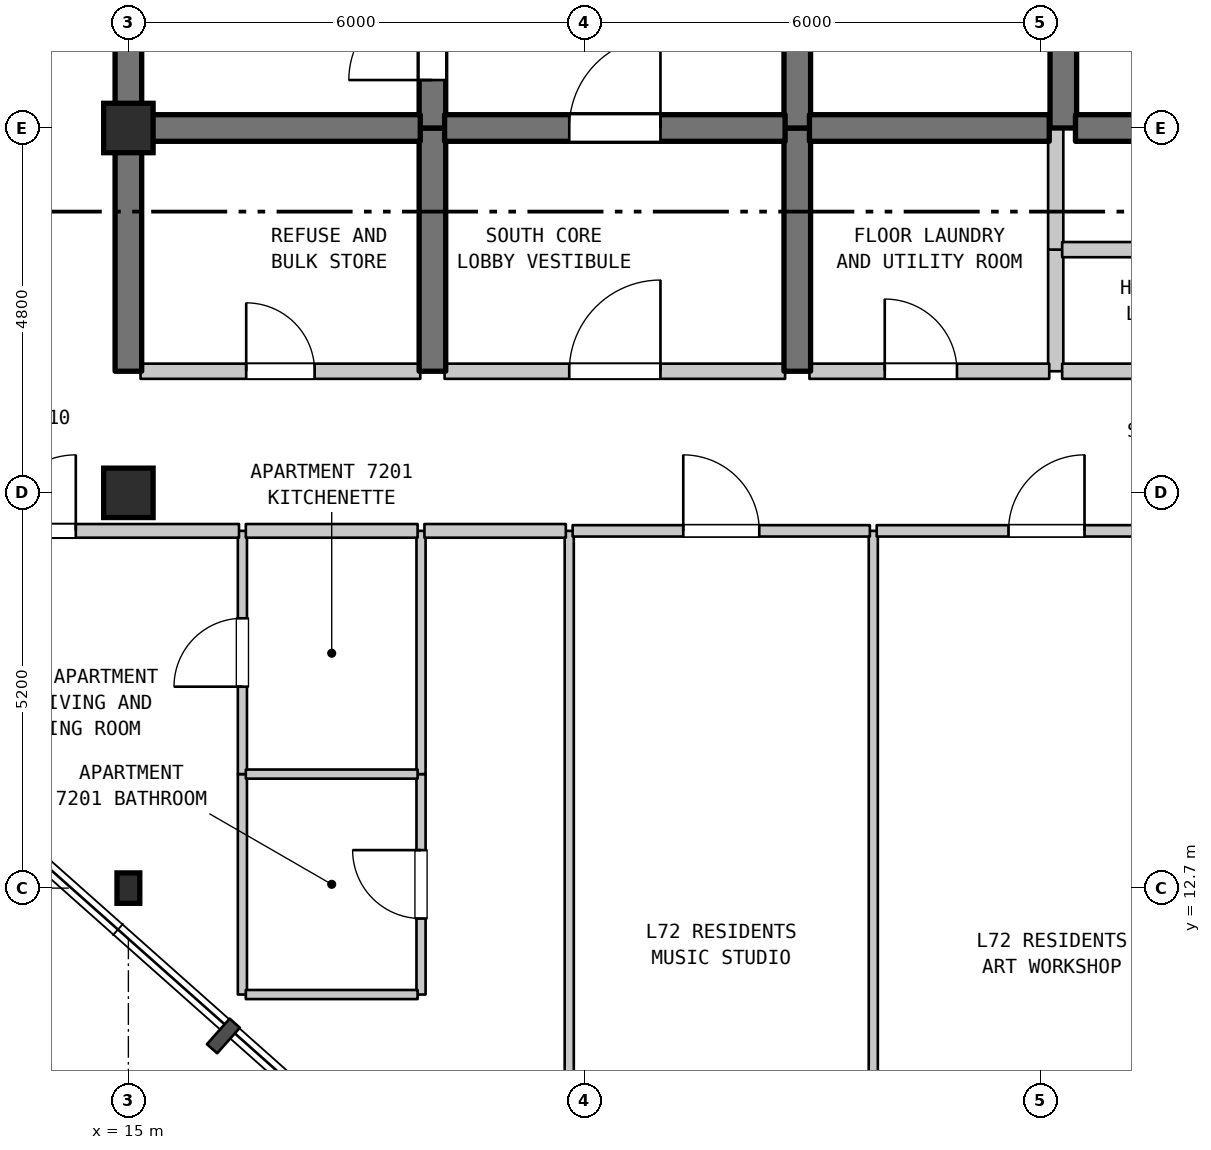
"""IFC4 building model, lengths in metres.
Left out: names, types, materials, properties, quantities, classifications, styles, units other than length and angle.
Written with IfcOpenShell. Run it as: python <this file> out.ifc"""

import sys

from ifc_helpers import new_model, si_unit, direction, frame, frame_2d, origin, origin_2d, place, context, subcontext, project, spatial, rectangle, i_section, extrude, element, fill, save


model = new_model("IFC4")
c1 = context("Model", 3, precision=1e-05, world=origin(), true_north=direction((0.0, 1.0)))
c2 = subcontext(c1, "Body", "Model", "MODEL_VIEW")
j1 = project(units=[si_unit("LENGTHUNIT", "METRE"), si_unit("PLANEANGLEUNIT", "RADIAN")], contexts=[c1])
p1 = place(None, origin())
s1 = spatial("IfcSite", under=j1, at=p1, CompositionType="ELEMENT")
p2 = place(p1, origin())
s2 = spatial("IfcBuilding", under=s1, at=p2, CompositionType="ELEMENT")
p3 = place(p2, frame((0.0, 0.0, 288.0)))
s3 = spatial("IfcBuildingStorey", under=s2, at=p3, CompositionType="ELEMENT", Elevation=288.0)
p4 = place(p3, frame((15.0, 12.7, 0.0), z_axis=(0.0, 0.0, 1.0), x_axis=(1.0, 0.0, 0.0)))
e1 = element("IfcColumn", 1, at=p4, inside=s3, PredefinedType="COLUMN", context=c2, shape_type="SweptSolid", body=[
    extrude(i_section(OverallWidth=0.3, OverallDepth=0.4, WebThickness=0.013, FlangeThickness=0.024, FilletRadius=0.027, at=origin_2d()), origin(), (0.0, 0.0, 1.0), 3.7),
])
for number, where, z_axis, x_axis in (
    (2, (15.0, 17.9, 0.0), (0.0, 0.0, 1.0), (1.0, 0.0, 0.0)),
    (3, (15.0, 22.7, 0.0), (0.0, 0.0, 1.0), (1.0, 0.0, 0.0)),
):
    element("IfcColumn", number, at=place(p3, frame(where, z_axis=z_axis, x_axis=x_axis)), inside=s3, PredefinedType="COLUMN", context=c2, shape_type="SweptSolid", body=[
        extrude(rectangle(XDim=0.65, YDim=0.65, at=origin_2d()), origin(), (0.0, 0.0, 1.0), 3.7),
    ])
p5 = place(p3, frame((15.0, 19.5, 0.0), z_axis=(0.0, 0.0, 1.0), x_axis=(0.0, 1.0, 0.0)))
e4 = element("IfcWall", 4, at=p5, inside=s3, PredefinedType="SHEAR", context=c2, shape_type="SweptSolid", body=[
    extrude(rectangle(XDim=3.2, YDim=0.35, at=frame_2d((1.6, 0.0))), origin(), (0.0, 0.0, 1.0), 3.39),
])
p6 = place(p3, frame((15.0, 22.7, 0.0), z_axis=(0.0, 0.0, 1.0), x_axis=(0.0, 1.0, 0.0)))
e5 = element("IfcWall", 5, at=p6, inside=s3, PredefinedType="SHEAR", context=c2, shape_type="SweptSolid", body=[
    extrude(rectangle(XDim=6.8, YDim=0.35, at=frame_2d((3.4, 0.0))), origin(), (0.0, 0.0, 1.0), 3.39),
])
p7 = place(p3, frame((16.5, 11.3, 0.0), z_axis=(0.0, 0.0, 1.0), x_axis=(0.0, 1.0, 0.0)))
e6 = element("IfcWall", 6, at=p7, inside=s3, PredefinedType="PARTITIONING", context=c2, shape_type="SweptSolid", body=[
    extrude(rectangle(XDim=2.9, YDim=0.12, at=frame_2d((1.45, 0.0))), origin(), (0.0, 0.0, 1.0), 3.39),
])
p8 = place(p3, frame((16.5, 14.2, 0.0), z_axis=(0.0, 0.0, 1.0), x_axis=(0.0, 1.0, 0.0)))
e7 = element("IfcWall", 7, at=p8, inside=s3, PredefinedType="PARTITIONING", context=c2, shape_type="SweptSolid", body=[
    extrude(rectangle(XDim=3.2, YDim=0.12, at=frame_2d((1.6, 0.0))), origin(), (0.0, 0.0, 1.0), 3.39),
])
p9 = place(p8, frame((1.15, 0.0, 0.0)))
e8 = element("IfcOpeningElement", 8, at=p9, cuts=e7, PredefinedType="OPENING", context=c2, shape_type="SweptSolid", body=[
    extrude(rectangle(XDim=0.9, YDim=2.15, at=frame_2d((0.45, 1.075))), frame((0.0, 0.07, 0.0), z_axis=(0.0, -1.0, 0.0), x_axis=(1.0, 0.0, 0.0)), (0.0, 0.0, 1.0), 0.14),
])
p10 = place(p3, frame((18.85, 11.3, 0.0), z_axis=(0.0, 0.0, 1.0), x_axis=(0.0, 1.0, 0.0)))
e9 = element("IfcWall", 9, at=p10, inside=s3, PredefinedType="PARTITIONING", context=c2, shape_type="SweptSolid", body=[
    extrude(rectangle(XDim=2.9, YDim=0.12, at=frame_2d((1.45, 0.0))), origin(), (0.0, 0.0, 1.0), 3.39),
])
p11 = place(p10, frame((1.0, 0.0, 0.0)))
e10 = element("IfcOpeningElement", 10, at=p11, cuts=e9, PredefinedType="OPENING", context=c2, shape_type="SweptSolid", body=[
    extrude(rectangle(XDim=0.9, YDim=2.1, at=frame_2d((0.45, 1.05))), frame((0.0, 0.07, 0.0), z_axis=(0.0, -1.0, 0.0), x_axis=(1.0, 0.0, 0.0)), (0.0, 0.0, 1.0), 0.14),
])
p12 = place(p3, frame((18.85, 14.2, 0.0), z_axis=(0.0, 0.0, 1.0), x_axis=(0.0, 1.0, 0.0)))
e11 = element("IfcWall", 11, at=p12, inside=s3, PredefinedType="PARTITIONING", context=c2, shape_type="SweptSolid", body=[
    extrude(rectangle(XDim=3.2, YDim=0.12, at=frame_2d((1.6, 0.0))), origin(), (0.0, 0.0, 1.0), 3.39),
])
p13 = place(p3, frame((19.0, 19.5, 0.0), z_axis=(0.0, 0.0, 1.0), x_axis=(0.0, 1.0, 0.0)))
e12 = element("IfcWall", 12, at=p13, inside=s3, PredefinedType="SHEAR", context=c2, shape_type="SweptSolid", body=[
    extrude(rectangle(XDim=3.2, YDim=0.35, at=frame_2d((1.6, 0.0))), origin(), (0.0, 0.0, 1.0), 3.39),
])
p14 = place(p3, frame((19.0, 22.7, 0.0), z_axis=(0.0, 0.0, 1.0), x_axis=(0.0, 1.0, 0.0)))
e13 = element("IfcWall", 13, at=p14, inside=s3, PredefinedType="SHEAR", context=c2, shape_type="SweptSolid", body=[
    extrude(rectangle(XDim=5.5, YDim=0.35, at=frame_2d((2.75, 0.0))), origin(), (0.0, 0.0, 1.0), 3.39),
])
p15 = place(p14, frame((0.631, 0.0, 0.0)))
e14 = element("IfcOpeningElement", 14, at=p15, cuts=e13, PredefinedType="OPENING", context=c2, shape_type="SweptSolid", body=[
    extrude(rectangle(XDim=1.1, YDim=2.15, at=frame_2d((0.55, 1.075))), frame((0.0, 0.185, 0.0), z_axis=(0.0, -1.0, 0.0), x_axis=(1.0, 0.0, 0.0)), (0.0, 0.0, 1.0), 0.37),
])
p16 = place(p3, frame((20.8, 7.075, 0.0), z_axis=(0.0, 0.0, 1.0), x_axis=(0.0, 1.0, 0.0)))
e15 = element("IfcWall", 15, at=p16, inside=s3, PredefinedType="PARTITIONING", context=c2, shape_type="SweptSolid", body=[
    extrude(rectangle(XDim=10.325, YDim=0.12, at=frame_2d((5.163, 0.0))), origin(), (0.0, 0.0, 1.0), 3.39),
])
p17 = place(p3, frame((23.8, 19.5, 0.0), z_axis=(0.0, 0.0, 1.0), x_axis=(0.0, 1.0, 0.0)))
e16 = element("IfcWall", 16, at=p17, inside=s3, PredefinedType="SHEAR", context=c2, shape_type="SweptSolid", body=[
    extrude(rectangle(XDim=3.2, YDim=0.35, at=frame_2d((1.6, 0.0))), origin(), (0.0, 0.0, 1.0), 3.39),
])
p18 = place(p3, frame((23.8, 22.7, 0.0), z_axis=(0.0, 0.0, 1.0), x_axis=(0.0, 1.0, 0.0)))
e17 = element("IfcWall", 17, at=p18, inside=s3, PredefinedType="SHEAR", context=c2, shape_type="SweptSolid", body=[
    extrude(rectangle(XDim=3.4, YDim=0.35, at=frame_2d((1.7, 0.0))), origin(), (0.0, 0.0, 1.0), 3.39),
])
p19 = place(p18, frame((1.25, 0.0, 0.0)))
e18 = element("IfcOpeningElement", 18, at=p19, cuts=e17, PredefinedType="OPENING", context=c2, shape_type="SweptSolid", body=[
    extrude(rectangle(XDim=0.9, YDim=2.15, at=frame_2d((0.45, 1.075))), frame((0.0, 0.185, 0.0), z_axis=(0.0, -1.0, 0.0), x_axis=(1.0, 0.0, 0.0)), (0.0, 0.0, 1.0), 0.37),
])
p20 = place(p3, frame((24.8, 6.71, 0.0), z_axis=(0.0, 0.0, 1.0), x_axis=(0.0, 1.0, 0.0)))
e19 = element("IfcWall", 19, at=p20, inside=s3, PredefinedType="PARTITIONING", context=c2, shape_type="SweptSolid", body=[
    extrude(rectangle(XDim=10.69, YDim=0.12, at=frame_2d((5.345, 0.0))), origin(), (0.0, 0.0, 1.0), 3.39),
])
p21 = place(p3, frame((27.2, 19.5, 0.0), z_axis=(0.0, 0.0, 1.0), x_axis=(0.0, 1.0, 0.0)))
e20 = element("IfcWall", 20, at=p21, inside=s3, PredefinedType="STANDARD", context=c2, shape_type="SweptSolid", body=[
    extrude(rectangle(XDim=1.6, YDim=0.2, at=frame_2d((0.8, 0.0))), origin(), (0.0, 0.0, 1.0), 3.39),
])
p22 = place(p3, frame((27.2, 21.1, 0.0), z_axis=(0.0, 0.0, 1.0), x_axis=(0.0, 1.0, 0.0)))
e21 = element("IfcWall", 21, at=p22, inside=s3, PredefinedType="STANDARD", context=c2, shape_type="SweptSolid", body=[
    extrude(rectangle(XDim=1.6, YDim=0.2, at=frame_2d((0.8, 0.0))), origin(), (0.0, 0.0, 1.0), 3.39),
])
p23 = place(p3, frame((27.3, 22.7, 0.0), z_axis=(0.0, 0.0, 1.0), x_axis=(0.0, 1.0, 0.0)))
e22 = element("IfcWall", 22, at=p23, inside=s3, PredefinedType="SHEAR", context=c2, shape_type="SweptSolid", body=[
    extrude(rectangle(XDim=2.9, YDim=0.35, at=frame_2d((1.45, 0.0))), origin(), (0.0, 0.0, 1.0), 3.39),
])
for number, where, z_axis, x_axis in (
    (23, (16.545, 11.3, 0.0), (0.0, 0.0, 1.0), (1.0, 0.0, 0.0)),
    (24, (16.545, 14.2, 0.0), (0.0, 0.0, 1.0), (1.0, 0.0, 0.0)),
):
    element("IfcWall", number, at=place(p3, frame(where, z_axis=z_axis, x_axis=x_axis)), inside=s3, PredefinedType="PARTITIONING", context=c2, shape_type="SweptSolid", body=[
        extrude(rectangle(XDim=2.26, YDim=0.12, at=frame_2d((1.13, 0.0))), origin(), (0.0, 0.0, 1.0), 3.39),
    ])
p24 = place(p3, frame((12.975, 17.4, 0.0), z_axis=(0.0, 0.0, 1.0), x_axis=(1.0, 0.0, 0.0)))
e25 = element("IfcWall", 25, at=p24, inside=s3, PredefinedType="STANDARD", context=c2, shape_type="SweptSolid", body=[
    extrude(rectangle(XDim=3.48, YDim=0.18, at=frame_2d((1.74, 0.0))), origin(), (0.0, 0.0, 1.0), 3.39),
])
p25 = place(p24, frame((0.333, 0.0, 0.0)))
e26 = element("IfcOpeningElement", 26, at=p25, cuts=e25, PredefinedType="OPENING", context=c2, shape_type="SweptSolid", body=[
    extrude(rectangle(XDim=1.0, YDim=2.15, at=frame_2d((0.5, 1.075))), frame((0.0, 0.1, 0.0), z_axis=(0.0, -1.0, 0.0), x_axis=(1.0, 0.0, 0.0)), (0.0, 0.0, 1.0), 0.2),
])
p26 = place(p3, frame((16.545, 17.4, 0.0), z_axis=(0.0, 0.0, 1.0), x_axis=(1.0, 0.0, 0.0)))
e27 = element("IfcWall", 27, at=p26, inside=s3, PredefinedType="STANDARD", context=c2, shape_type="SweptSolid", body=[
    extrude(rectangle(XDim=2.26, YDim=0.18, at=frame_2d((1.13, 0.0))), origin(), (0.0, 0.0, 1.0), 3.39),
])
p27 = place(p3, frame((18.895, 17.4, 0.0), z_axis=(0.0, 0.0, 1.0), x_axis=(1.0, 0.0, 0.0)))
e28 = element("IfcWall", 28, at=p27, inside=s3, PredefinedType="STANDARD", context=c2, shape_type="SweptSolid", body=[
    extrude(rectangle(XDim=1.86, YDim=0.18, at=frame_2d((0.93, 0.0))), origin(), (0.0, 0.0, 1.0), 3.39),
])
p28 = place(p3, frame((20.845, 17.4, 0.0), z_axis=(0.0, 0.0, 1.0), x_axis=(1.0, 0.0, 0.0)))
e29 = element("IfcWall", 29, at=p28, inside=s3, PredefinedType="STANDARD", context=c2, shape_type="SweptSolid", body=[
    extrude(rectangle(XDim=3.91, YDim=0.15, at=frame_2d((1.955, 0.0))), origin(), (0.0, 0.0, 1.0), 3.39),
])
p29 = place(p28, frame((1.455, 0.0, 0.0)))
e30 = element("IfcOpeningElement", 30, at=p29, cuts=e29, PredefinedType="OPENING", context=c2, shape_type="SweptSolid", body=[
    extrude(rectangle(XDim=1.0, YDim=2.15, at=frame_2d((0.5, 1.075))), frame((0.0, 0.085, 0.0), z_axis=(0.0, -1.0, 0.0), x_axis=(1.0, 0.0, 0.0)), (0.0, 0.0, 1.0), 0.17),
])
p30 = place(p3, frame((24.845, 17.4, 0.0), z_axis=(0.0, 0.0, 1.0), x_axis=(1.0, 0.0, 0.0)))
e31 = element("IfcWall", 31, at=p30, inside=s3, PredefinedType="STANDARD", context=c2, shape_type="SweptSolid", body=[
    extrude(rectangle(XDim=4.61, YDim=0.15, at=frame_2d((2.305, 0.0))), origin(), (0.0, 0.0, 1.0), 3.39),
])
p31 = place(p30, frame((1.734, 0.0, 0.0)))
e32 = element("IfcOpeningElement", 32, at=p31, cuts=e31, PredefinedType="OPENING", context=c2, shape_type="SweptSolid", body=[
    extrude(rectangle(XDim=1.0, YDim=2.15, at=frame_2d((0.5, 1.075))), frame((0.0, 0.085, 0.0), z_axis=(0.0, -1.0, 0.0), x_axis=(1.0, 0.0, 0.0)), (0.0, 0.0, 1.0), 0.17),
])
p32 = place(p3, frame((15.16, 19.5, 0.0), z_axis=(0.0, 0.0, 1.0), x_axis=(1.0, 0.0, 0.0)))
e33 = element("IfcWall", 33, at=p32, inside=s3, PredefinedType="STANDARD", context=c2, shape_type="SweptSolid", body=[
    extrude(rectangle(XDim=3.68, YDim=0.2, at=frame_2d((1.84, 0.0))), origin(), (0.0, 0.0, 1.0), 3.39),
])
p33 = place(p32, frame((1.39, 0.0, 0.0)))
e34 = element("IfcOpeningElement", 34, at=p33, cuts=e33, PredefinedType="OPENING", context=c2, shape_type="SweptSolid", body=[
    extrude(rectangle(XDim=0.9, YDim=2.15, at=frame_2d((0.45, 1.075))), frame((0.0, 0.11, 0.0), z_axis=(0.0, -1.0, 0.0), x_axis=(1.0, 0.0, 0.0)), (0.0, 0.0, 1.0), 0.22),
])
p34 = place(p3, frame((19.16, 19.5, 0.0), z_axis=(0.0, 0.0, 1.0), x_axis=(1.0, 0.0, 0.0)))
e35 = element("IfcWall", 35, at=p34, inside=s3, PredefinedType="STANDARD", context=c2, shape_type="SweptSolid", body=[
    extrude(rectangle(XDim=4.48, YDim=0.2, at=frame_2d((2.24, 0.0))), origin(), (0.0, 0.0, 1.0), 3.39),
])
p35 = place(p34, frame((1.64, 0.0, 0.0)))
e36 = element("IfcOpeningElement", 36, at=p35, cuts=e35, PredefinedType="OPENING", context=c2, shape_type="SweptSolid", body=[
    extrude(rectangle(XDim=1.2, YDim=2.2, at=frame_2d((0.6, 1.1))), frame((0.0, 0.11, 0.0), z_axis=(0.0, -1.0, 0.0), x_axis=(1.0, 0.0, 0.0)), (0.0, 0.0, 1.0), 0.22),
])
p36 = place(p3, frame((23.96, 19.5, 0.0), z_axis=(0.0, 0.0, 1.0), x_axis=(1.0, 0.0, 0.0)))
e37 = element("IfcWall", 37, at=p36, inside=s3, PredefinedType="STANDARD", context=c2, shape_type="SweptSolid", body=[
    extrude(rectangle(XDim=3.155, YDim=0.2, at=frame_2d((1.578, 0.0))), origin(), (0.0, 0.0, 1.0), 3.39),
])
p37 = place(p36, frame((0.991, 0.0, 0.0)))
e38 = element("IfcOpeningElement", 38, at=p37, cuts=e37, PredefinedType="OPENING", context=c2, shape_type="SweptSolid", body=[
    extrude(rectangle(XDim=0.95, YDim=2.15, at=frame_2d((0.475, 1.075))), frame((0.0, 0.11, 0.0), z_axis=(0.0, -1.0, 0.0), x_axis=(1.0, 0.0, 0.0)), (0.0, 0.0, 1.0), 0.22),
])
p38 = place(p3, frame((27.285, 19.5, 0.0), z_axis=(0.0, 0.0, 1.0), x_axis=(1.0, 0.0, 0.0)))
e39 = element("IfcWall", 39, at=p38, inside=s3, PredefinedType="STANDARD", context=c2, shape_type="SweptSolid", body=[
    extrude(rectangle(XDim=3.43, YDim=0.2, at=frame_2d((1.715, 0.0))), origin(), (0.0, 0.0, 1.0), 3.39),
])
p39 = place(p38, frame((1.192, 0.0, 0.0)))
e40 = element("IfcOpeningElement", 40, at=p39, cuts=e39, PredefinedType="OPENING", context=c2, shape_type="SweptSolid", body=[
    extrude(rectangle(XDim=0.9, YDim=2.15, at=frame_2d((0.45, 1.075))), frame((0.0, 0.11, 0.0), z_axis=(0.0, -1.0, 0.0), x_axis=(1.0, 0.0, 0.0)), (0.0, 0.0, 1.0), 0.22),
])
p40 = place(p3, frame((27.285, 21.1, 0.0), z_axis=(0.0, 0.0, 1.0), x_axis=(1.0, 0.0, 0.0)))
e41 = element("IfcWall", 41, at=p40, inside=s3, PredefinedType="STANDARD", context=c2, shape_type="SweptSolid", body=[
    extrude(rectangle(XDim=3.355, YDim=0.2, at=frame_2d((1.677, 0.0))), origin(), (0.0, 0.0, 1.0), 3.39),
])
p41 = place(p3, frame((15.16, 22.7, 0.0), z_axis=(0.0, 0.0, 1.0), x_axis=(1.0, 0.0, 0.0)))
e42 = element("IfcWall", 42, at=p41, inside=s3, PredefinedType="SHEAR", context=c2, shape_type="SweptSolid", body=[
    extrude(rectangle(XDim=3.68, YDim=0.35, at=frame_2d((1.84, 0.0))), origin(), (0.0, 0.0, 1.0), 3.39),
])
p42 = place(p3, frame((19.16, 22.7, 0.0), z_axis=(0.0, 0.0, 1.0), x_axis=(1.0, 0.0, 0.0)))
e43 = element("IfcWall", 43, at=p42, inside=s3, PredefinedType="SHEAR", context=c2, shape_type="SweptSolid", body=[
    extrude(rectangle(XDim=4.48, YDim=0.35, at=frame_2d((2.24, 0.0))), origin(), (0.0, 0.0, 1.0), 3.39),
])
p43 = place(p42, frame((1.64, 0.0, 0.0)))
e44 = element("IfcOpeningElement", 44, at=p43, cuts=e43, PredefinedType="OPENING", context=c2, shape_type="SweptSolid", body=[
    extrude(rectangle(XDim=1.2, YDim=2.2, at=frame_2d((0.6, 1.1))), frame((0.0, 0.185, 0.0), z_axis=(0.0, -1.0, 0.0), x_axis=(1.0, 0.0, 0.0)), (0.0, 0.0, 1.0), 0.37),
])
p44 = place(p3, frame((23.96, 22.7, 0.0), z_axis=(0.0, 0.0, 1.0), x_axis=(1.0, 0.0, 0.0)))
e45 = element("IfcWall", 45, at=p44, inside=s3, PredefinedType="SHEAR", context=c2, shape_type="SweptSolid", body=[
    extrude(rectangle(XDim=3.155, YDim=0.35, at=frame_2d((1.578, 0.0))), origin(), (0.0, 0.0, 1.0), 3.39),
])
p45 = place(p3, frame((27.46, 22.7, 0.0), z_axis=(0.0, 0.0, 1.0), x_axis=(1.0, 0.0, 0.0)))
e46 = element("IfcWall", 46, at=p45, inside=s3, PredefinedType="SHEAR", context=c2, shape_type="SweptSolid", body=[
    extrude(rectangle(XDim=3.18, YDim=0.35, at=frame_2d((1.59, 0.0))), origin(), (0.0, 0.0, 1.0), 3.39),
])
p46 = place(p9, origin())
e47 = element("IfcDoor", 47, at=p46, inside=s3, OperationType="SINGLE_SWING_LEFT", PredefinedType="DOOR", context=c2, shape_type="SweptSolid", body=[
    extrude(rectangle(XDim=0.9, YDim=2.15, at=frame_2d((0.45, 1.075))), frame((0.0, 0.025, 0.0), z_axis=(0.0, -1.0, 0.0), x_axis=(1.0, 0.0, 0.0)), (0.0, 0.0, 1.0), 0.05),
])
fill(e8, e47)
p47 = place(p11, origin())
e48 = element("IfcDoor", 48, at=p47, inside=s3, OperationType="SINGLE_SWING_RIGHT", PredefinedType="DOOR", context=c2, shape_type="SweptSolid", body=[
    extrude(rectangle(XDim=0.9, YDim=2.1, at=frame_2d((0.45, 1.05))), frame((0.0, 0.025, 0.0), z_axis=(0.0, -1.0, 0.0), x_axis=(1.0, 0.0, 0.0)), (0.0, 0.0, 1.0), 0.05),
])
fill(e10, e48)
p48 = place(p15, origin())
e49 = element("IfcDoor", 49, at=p48, inside=s3, OperationType="SINGLE_SWING_LEFT", PredefinedType="DOOR", context=c2, shape_type="SweptSolid", body=[
    extrude(rectangle(XDim=1.1, YDim=2.15, at=frame_2d((0.55, 1.075))), frame((0.0, 0.025, 0.0), z_axis=(0.0, -1.0, 0.0), x_axis=(1.0, 0.0, 0.0)), (0.0, 0.0, 1.0), 0.05),
])
fill(e14, e49)
p49 = place(p25, origin())
e50 = element("IfcDoor", 50, at=p49, inside=s3, OperationType="SINGLE_SWING_RIGHT", PredefinedType="DOOR", context=c2, shape_type="SweptSolid", body=[
    extrude(rectangle(XDim=1.0, YDim=2.15, at=frame_2d((0.5, 1.075))), frame((0.0, 0.025, 0.0), z_axis=(0.0, -1.0, 0.0), x_axis=(1.0, 0.0, 0.0)), (0.0, 0.0, 1.0), 0.05),
])
fill(e26, e50)
p50 = place(p29, origin())
e51 = element("IfcDoor", 51, at=p50, inside=s3, OperationType="SINGLE_SWING_LEFT", PredefinedType="DOOR", context=c2, shape_type="SweptSolid", body=[
    extrude(rectangle(XDim=1.0, YDim=2.15, at=frame_2d((0.5, 1.075))), frame((0.0, 0.025, 0.0), z_axis=(0.0, -1.0, 0.0), x_axis=(1.0, 0.0, 0.0)), (0.0, 0.0, 1.0), 0.05),
])
fill(e30, e51)
p51 = place(p31, origin())
e52 = element("IfcDoor", 52, at=p51, inside=s3, OperationType="SINGLE_SWING_RIGHT", PredefinedType="DOOR", context=c2, shape_type="SweptSolid", body=[
    extrude(rectangle(XDim=1.0, YDim=2.15, at=frame_2d((0.5, 1.075))), frame((0.0, 0.025, 0.0), z_axis=(0.0, -1.0, 0.0), x_axis=(1.0, 0.0, 0.0)), (0.0, 0.0, 1.0), 0.05),
])
fill(e32, e52)
p52 = place(p33, origin())
e53 = element("IfcDoor", 53, at=p52, inside=s3, OperationType="SINGLE_SWING_LEFT", PredefinedType="DOOR", context=c2, shape_type="SweptSolid", body=[
    extrude(rectangle(XDim=0.9, YDim=2.15, at=frame_2d((0.45, 1.075))), frame((0.0, 0.025, 0.0), z_axis=(0.0, -1.0, 0.0), x_axis=(1.0, 0.0, 0.0)), (0.0, 0.0, 1.0), 0.05),
])
fill(e34, e53)
p53 = place(p35, origin())
e54 = element("IfcDoor", 54, at=p53, inside=s3, OperationType="SINGLE_SWING_RIGHT", PredefinedType="DOOR", context=c2, shape_type="SweptSolid", body=[
    extrude(rectangle(XDim=1.2, YDim=2.2, at=frame_2d((0.6, 1.1))), frame((0.0, 0.025, 0.0), z_axis=(0.0, -1.0, 0.0), x_axis=(1.0, 0.0, 0.0)), (0.0, 0.0, 1.0), 0.05),
])
fill(e36, e54)
p54 = place(p37, origin())
e55 = element("IfcDoor", 55, at=p54, inside=s3, OperationType="SINGLE_SWING_LEFT", PredefinedType="DOOR", context=c2, shape_type="SweptSolid", body=[
    extrude(rectangle(XDim=0.95, YDim=2.15, at=frame_2d((0.475, 1.075))), frame((0.0, 0.025, 0.0), z_axis=(0.0, -1.0, 0.0), x_axis=(1.0, 0.0, 0.0)), (0.0, 0.0, 1.0), 0.05),
])
fill(e38, e55)
p55 = place(p43, origin())
e56 = element("IfcDoor", 56, at=p55, inside=s3, OperationType="SINGLE_SWING_RIGHT", PredefinedType="DOOR", context=c2, shape_type="SweptSolid", body=[
    extrude(rectangle(XDim=1.2, YDim=2.2, at=frame_2d((0.6, 1.1))), frame((0.0, 0.025, 0.0), z_axis=(0.0, -1.0, 0.0), x_axis=(1.0, 0.0, 0.0)), (0.0, 0.0, 1.0), 0.05),
])
fill(e44, e56)
save(model, sys.argv[1])
